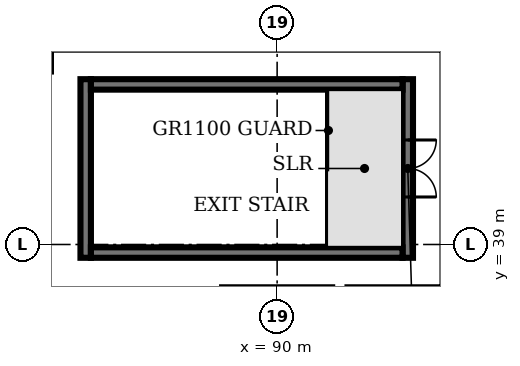
"""IFC4 building model, lengths in metres.
Left out: names, types, materials, properties, quantities, classifications, styles, units other than length and angle.
Written with IfcOpenShell. Run it as: python <this file> out.ifc"""

import sys

from ifc_helpers import new_model, si_unit, direction, frame, frame_2d, origin, place, context, subcontext, project, spatial, rectangle, extrude, element, fill, save


model = new_model("IFC4")
c1 = context("Model", 3, precision=1e-05, world=origin(), true_north=direction((0.0, 1.0)))
c2 = subcontext(c1, "Body", "Model", "MODEL_VIEW")
j1 = project(units=[si_unit("LENGTHUNIT", "METRE"), si_unit("PLANEANGLEUNIT", "RADIAN")], contexts=[c1])
p1 = place(None, origin())
s1 = spatial("IfcSite", under=j1, at=p1, CompositionType="ELEMENT")
p2 = place(p1, origin())
s2 = spatial("IfcBuilding", under=s1, at=p2, CompositionType="ELEMENT")
p3 = place(p2, frame((0.0, 0.0, 11.0)))
s3 = spatial("IfcBuildingStorey", under=s2, at=p3, CompositionType="ELEMENT", Elevation=11.0)
p4 = place(p3, frame((84.962, 38.65, 0.0), z_axis=(0.0, 0.0, 1.0), x_axis=(0.0, 1.0, 0.0)))
e1 = element("IfcWall", 1, at=p4, inside=s3, PredefinedType="SHEAR", context=c2, shape_type="SweptSolid", body=[
    extrude(rectangle(XDim=4.7, YDim=0.275, at=frame_2d((2.35, 0.0))), origin(), (0.0, 0.0, 1.0), 3.0),
])
p5 = place(p3, frame((93.438, 43.35, 0.0), z_axis=(0.0, 0.0, 1.0), x_axis=(0.0, -1.0, 0.0)))
e2 = element("IfcWall", 2, at=p5, inside=s3, PredefinedType="SHEAR", context=c2, shape_type="SweptSolid", body=[
    extrude(rectangle(XDim=4.7, YDim=0.275, at=frame_2d((2.35, 0.0))), origin(), (0.0, 0.0, 1.0), 3.0),
])
p6 = place(p5, frame((1.6, 0.0, 0.0)))
e3 = element("IfcOpeningElement", 3, at=p6, cuts=e2, PredefinedType="OPENING", context=c2, shape_type="SweptSolid", body=[
    extrude(rectangle(XDim=1.5, YDim=2.1, at=frame_2d((0.75, 1.05))), frame((0.0, 0.147, 0.0), z_axis=(0.0, -1.0, 0.0), x_axis=(1.0, 0.0, 0.0)), (0.0, 0.0, 1.0), 0.295),
])
for number, where, z_axis, x_axis in (
    (4, (85.1, 38.788, 0.0), (0.0, 0.0, 1.0), (1.0, 0.0, 0.0)),
    (5, (85.1, 43.212, 0.0), (0.0, 0.0, 1.0), (1.0, 0.0, 0.0)),
):
    element("IfcWall", number, at=place(p3, frame(where, z_axis=z_axis, x_axis=x_axis)), inside=s3, PredefinedType="SHEAR", context=c2, shape_type="SweptSolid", body=[
        extrude(rectangle(XDim=8.2, YDim=0.275, at=frame_2d((4.1, 0.0))), origin(), (0.0, 0.0, 1.0), 3.0),
    ])
p7 = place(p6, origin())
e6 = element("IfcDoor", 6, at=p7, inside=s3, OperationType="DOUBLE_DOOR_SINGLE_SWING", PredefinedType="DOOR", context=c2, shape_type="SweptSolid", body=[
    extrude(rectangle(XDim=1.5, YDim=2.1, at=frame_2d((0.75, 1.05))), frame((0.0, 0.025, 0.0), z_axis=(0.0, -1.0, 0.0), x_axis=(1.0, 0.0, 0.0)), (0.0, 0.0, 1.0), 0.05),
])
fill(e3, e6)
save(model, sys.argv[1])
